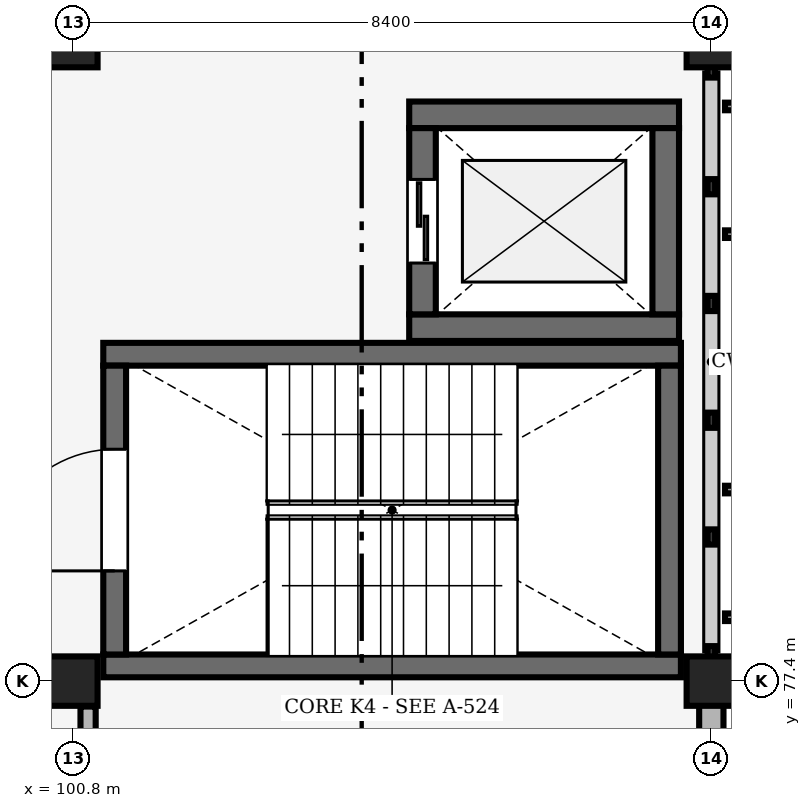
"""IFC4 building model, lengths in metres.
Left out: names, types, materials, properties, quantities, classifications, styles, units other than length and angle.
Written with IfcOpenShell. Run it as: python <this file> out.ifc"""

import sys

from ifc_helpers import new_model, si_unit, direction, frame, frame_2d, origin, origin_2d, place, context, subcontext, project, spatial, rectangle, extrude, element, fill, save


model = new_model("IFC4")
c1 = context("Model", 3, precision=1e-05, world=origin(), true_north=direction((0.0, 1.0)))
c2 = subcontext(c1, "Body", "Model", "MODEL_VIEW")
j1 = project(units=[si_unit("LENGTHUNIT", "METRE"), si_unit("PLANEANGLEUNIT", "RADIAN")], contexts=[c1])
p1 = place(None, origin())
s1 = spatial("IfcSite", under=j1, at=p1, CompositionType="ELEMENT")
p2 = place(p1, origin())
s2 = spatial("IfcBuilding", under=s1, at=p2, CompositionType="ELEMENT")
p3 = place(p2, frame((0.0, 0.0, 4.8)))
s3 = spatial("IfcBuildingStorey", under=s2, at=p3, CompositionType="ELEMENT", Elevation=4.8)
for number, where, z_axis, x_axis in (
    (1, (100.8, 77.4, 0.0), (0.0, 0.0, 1.0), (1.0, 0.0, 0.0)),
    (2, (100.8, 85.8, 0.0), (0.0, 0.0, 1.0), (1.0, 0.0, 0.0)),
    (3, (109.2, 77.4, 0.0), (0.0, 0.0, 1.0), (1.0, 0.0, 0.0)),
    (4, (109.2, 85.8, 0.0), (0.0, 0.0, 1.0), (1.0, 0.0, 0.0)),
):
    element("IfcColumn", number, at=place(p3, frame(where, z_axis=z_axis, x_axis=x_axis)), inside=s3, PredefinedType="COLUMN", context=c2, shape_type="SweptSolid", body=[
        extrude(rectangle(XDim=0.65, YDim=0.65, at=origin_2d()), origin(), (0.0, 0.0, 1.0), 4.2),
    ])
p4 = place(p3, frame((109.2, 69.3, 0.0), z_axis=(0.0, 0.0, 1.0), x_axis=(0.0, 1.0, 0.0)))
e5 = element("IfcWall", 5, at=p4, inside=s3, PredefinedType="SOLIDWALL", context=c2, shape_type="SweptSolid", body=[
    extrude(rectangle(XDim=7.8, YDim=0.32, at=frame_2d((3.9, 0.0))), origin(), (0.0, 0.0, 1.0), 3.25),
])
p5 = place(p4, frame((0.45, 0.0, 0.85)))
e6 = element("IfcOpeningElement", 6, at=p5, cuts=e5, PredefinedType="OPENING", context=c2, shape_type="SweptSolid", body=[
    extrude(rectangle(XDim=1.2, YDim=1.8, at=frame_2d((0.6, 0.9))), frame((0.0, 0.17, 0.0), z_axis=(0.0, -1.0, 0.0), x_axis=(1.0, 0.0, 0.0)), (0.0, 0.0, 1.0), 0.34),
])
p6 = place(p4, frame((6.15, 0.0, 0.85)))
e7 = element("IfcOpeningElement", 7, at=p6, cuts=e5, PredefinedType="OPENING", context=c2, shape_type="SweptSolid", body=[
    extrude(rectangle(XDim=1.2, YDim=1.8, at=frame_2d((0.6, 0.9))), frame((0.0, 0.17, 0.0), z_axis=(0.0, -1.0, 0.0), x_axis=(1.0, 0.0, 0.0)), (0.0, 0.0, 1.0), 0.34),
])
for number, where, z_axis, x_axis in (
    (8, (101.2, 77.6, 0.0), (0.0, 0.0, 1.0), (1.0, 0.0, 0.0)),
    (9, (101.2, 81.7, 0.0), (0.0, 0.0, 1.0), (1.0, 0.0, 0.0)),
):
    element("IfcWall", number, at=place(p3, frame(where, z_axis=z_axis, x_axis=x_axis)), inside=s3, PredefinedType="SHEAR", context=c2, shape_type="SweptSolid", body=[
        extrude(rectangle(XDim=7.6, YDim=0.3, at=frame_2d((3.8, 0.0))), origin(), (0.0, 0.0, 1.0), 4.025),
    ])
p7 = place(p3, frame((101.35, 77.75, 0.0), z_axis=(0.0, 0.0, 1.0), x_axis=(0.0, 1.0, 0.0)))
e10 = element("IfcWall", 10, at=p7, inside=s3, PredefinedType="SHEAR", context=c2, shape_type="SweptSolid", body=[
    extrude(rectangle(XDim=3.8, YDim=0.3, at=frame_2d((1.9, 0.0))), origin(), (0.0, 0.0, 1.0), 4.025),
])
p8 = place(p7, frame((1.1, 0.0, 0.0)))
e11 = element("IfcOpeningElement", 11, at=p8, cuts=e10, PredefinedType="OPENING", context=c2, shape_type="SweptSolid", body=[
    extrude(rectangle(XDim=1.6, YDim=2.2, at=frame_2d((0.8, 1.1))), frame((0.0, 0.16, 0.0), z_axis=(0.0, -1.0, 0.0), x_axis=(1.0, 0.0, 0.0)), (0.0, 0.0, 1.0), 0.32),
])
p9 = place(p3, frame((108.65, 77.75, 0.0), z_axis=(0.0, 0.0, 1.0), x_axis=(0.0, 1.0, 0.0)))
e12 = element("IfcWall", 12, at=p9, inside=s3, PredefinedType="SHEAR", context=c2, shape_type="SweptSolid", body=[
    extrude(rectangle(XDim=3.8, YDim=0.3, at=frame_2d((1.9, 0.0))), origin(), (0.0, 0.0, 1.0), 4.025),
])
for number, where, z_axis, x_axis in (
    (13, (105.225, 82.05, 0.0), (0.0, 0.0, 1.0), (1.0, 0.0, 0.0)),
    (14, (105.225, 84.85, 0.0), (0.0, 0.0, 1.0), (1.0, 0.0, 0.0)),
):
    element("IfcWall", number, at=place(p3, frame(where, z_axis=z_axis, x_axis=x_axis)), inside=s3, PredefinedType="SHEAR", context=c2, shape_type="SweptSolid", body=[
        extrude(rectangle(XDim=3.55, YDim=0.35, at=frame_2d((1.775, 0.0))), origin(), (0.0, 0.0, 1.0), 3.92),
    ])
p10 = place(p3, frame((105.4, 82.225, 0.0), z_axis=(0.0, 0.0, 1.0), x_axis=(0.0, 1.0, 0.0)))
e15 = element("IfcWall", 15, at=p10, inside=s3, PredefinedType="SHEAR", context=c2, shape_type="SweptSolid", body=[
    extrude(rectangle(XDim=2.45, YDim=0.35, at=frame_2d((1.225, 0.0))), origin(), (0.0, 0.0, 1.0), 3.92),
])
p11 = place(p10, frame((0.675, 0.0, 0.0)))
e16 = element("IfcOpeningElement", 16, at=p11, cuts=e15, PredefinedType="OPENING", context=c2, shape_type="SweptSolid", body=[
    extrude(rectangle(XDim=1.1, YDim=2.2, at=frame_2d((0.55, 1.1))), frame((0.0, 0.185, 0.0), z_axis=(0.0, -1.0, 0.0), x_axis=(1.0, 0.0, 0.0)), (0.0, 0.0, 1.0), 0.37),
])
p12 = place(p3, frame((108.6, 82.225, 0.0), z_axis=(0.0, 0.0, 1.0), x_axis=(0.0, 1.0, 0.0)))
e17 = element("IfcWall", 17, at=p12, inside=s3, PredefinedType="SHEAR", context=c2, shape_type="SweptSolid", body=[
    extrude(rectangle(XDim=2.45, YDim=0.35, at=frame_2d((1.225, 0.0))), origin(), (0.0, 0.0, 1.0), 3.92),
])
p13 = place(p3, frame((101.0, 69.335, 0.0), z_axis=(0.0, 0.0, 1.0), x_axis=(0.0, 1.0, 0.0)))
e18 = element("IfcWall", 18, at=p13, inside=s3, PredefinedType="PARTITIONING", context=c2, shape_type="SweptSolid", body=[
    extrude(rectangle(XDim=7.73, YDim=0.2, at=frame_2d((3.865, 0.0))), origin(), (0.0, 0.0, 1.0), 3.05),
])
p14 = place(p13, frame((1.365, 0.0, 0.0)))
e19 = element("IfcOpeningElement", 19, at=p14, cuts=e18, PredefinedType="OPENING", context=c2, shape_type="SweptSolid", body=[
    extrude(rectangle(XDim=0.9, YDim=2.1, at=frame_2d((0.45, 1.05))), frame((0.0, 0.11, 0.0), z_axis=(0.0, -1.0, 0.0), x_axis=(1.0, 0.0, 0.0)), (0.0, 0.0, 1.0), 0.22),
])
p15 = place(p13, frame((4.94, 0.0, 0.0)))
e20 = element("IfcOpeningElement", 20, at=p15, cuts=e18, PredefinedType="OPENING", context=c2, shape_type="SweptSolid", body=[
    extrude(rectangle(XDim=1.05, YDim=2.2, at=frame_2d((0.525, 1.1))), frame((0.0, 0.11, 0.0), z_axis=(0.0, -1.0, 0.0), x_axis=(1.0, 0.0, 0.0)), (0.0, 0.0, 1.0), 0.22),
])
p16 = place(p8, origin())
e21 = element("IfcDoor", 21, at=p16, inside=s3, OperationType="DOUBLE_DOOR_SINGLE_SWING", PredefinedType="DOOR", context=c2, shape_type="SweptSolid", body=[
    extrude(rectangle(XDim=1.6, YDim=2.2, at=frame_2d((0.8, 1.1))), frame((0.0, 0.025, 0.0), z_axis=(0.0, -1.0, 0.0), x_axis=(1.0, 0.0, 0.0)), (0.0, 0.0, 1.0), 0.05),
])
fill(e11, e21)
p17 = place(p11, origin())
e22 = element("IfcDoor", 22, at=p17, inside=s3, OperationType="DOUBLE_DOOR_SLIDING", PredefinedType="DOOR", context=c2, shape_type="SweptSolid", body=[
    extrude(rectangle(XDim=1.1, YDim=2.2, at=frame_2d((0.55, 1.1))), frame((0.0, 0.025, 0.0), z_axis=(0.0, -1.0, 0.0), x_axis=(1.0, 0.0, 0.0)), (0.0, 0.0, 1.0), 0.05),
])
fill(e16, e22)
save(model, sys.argv[1])
